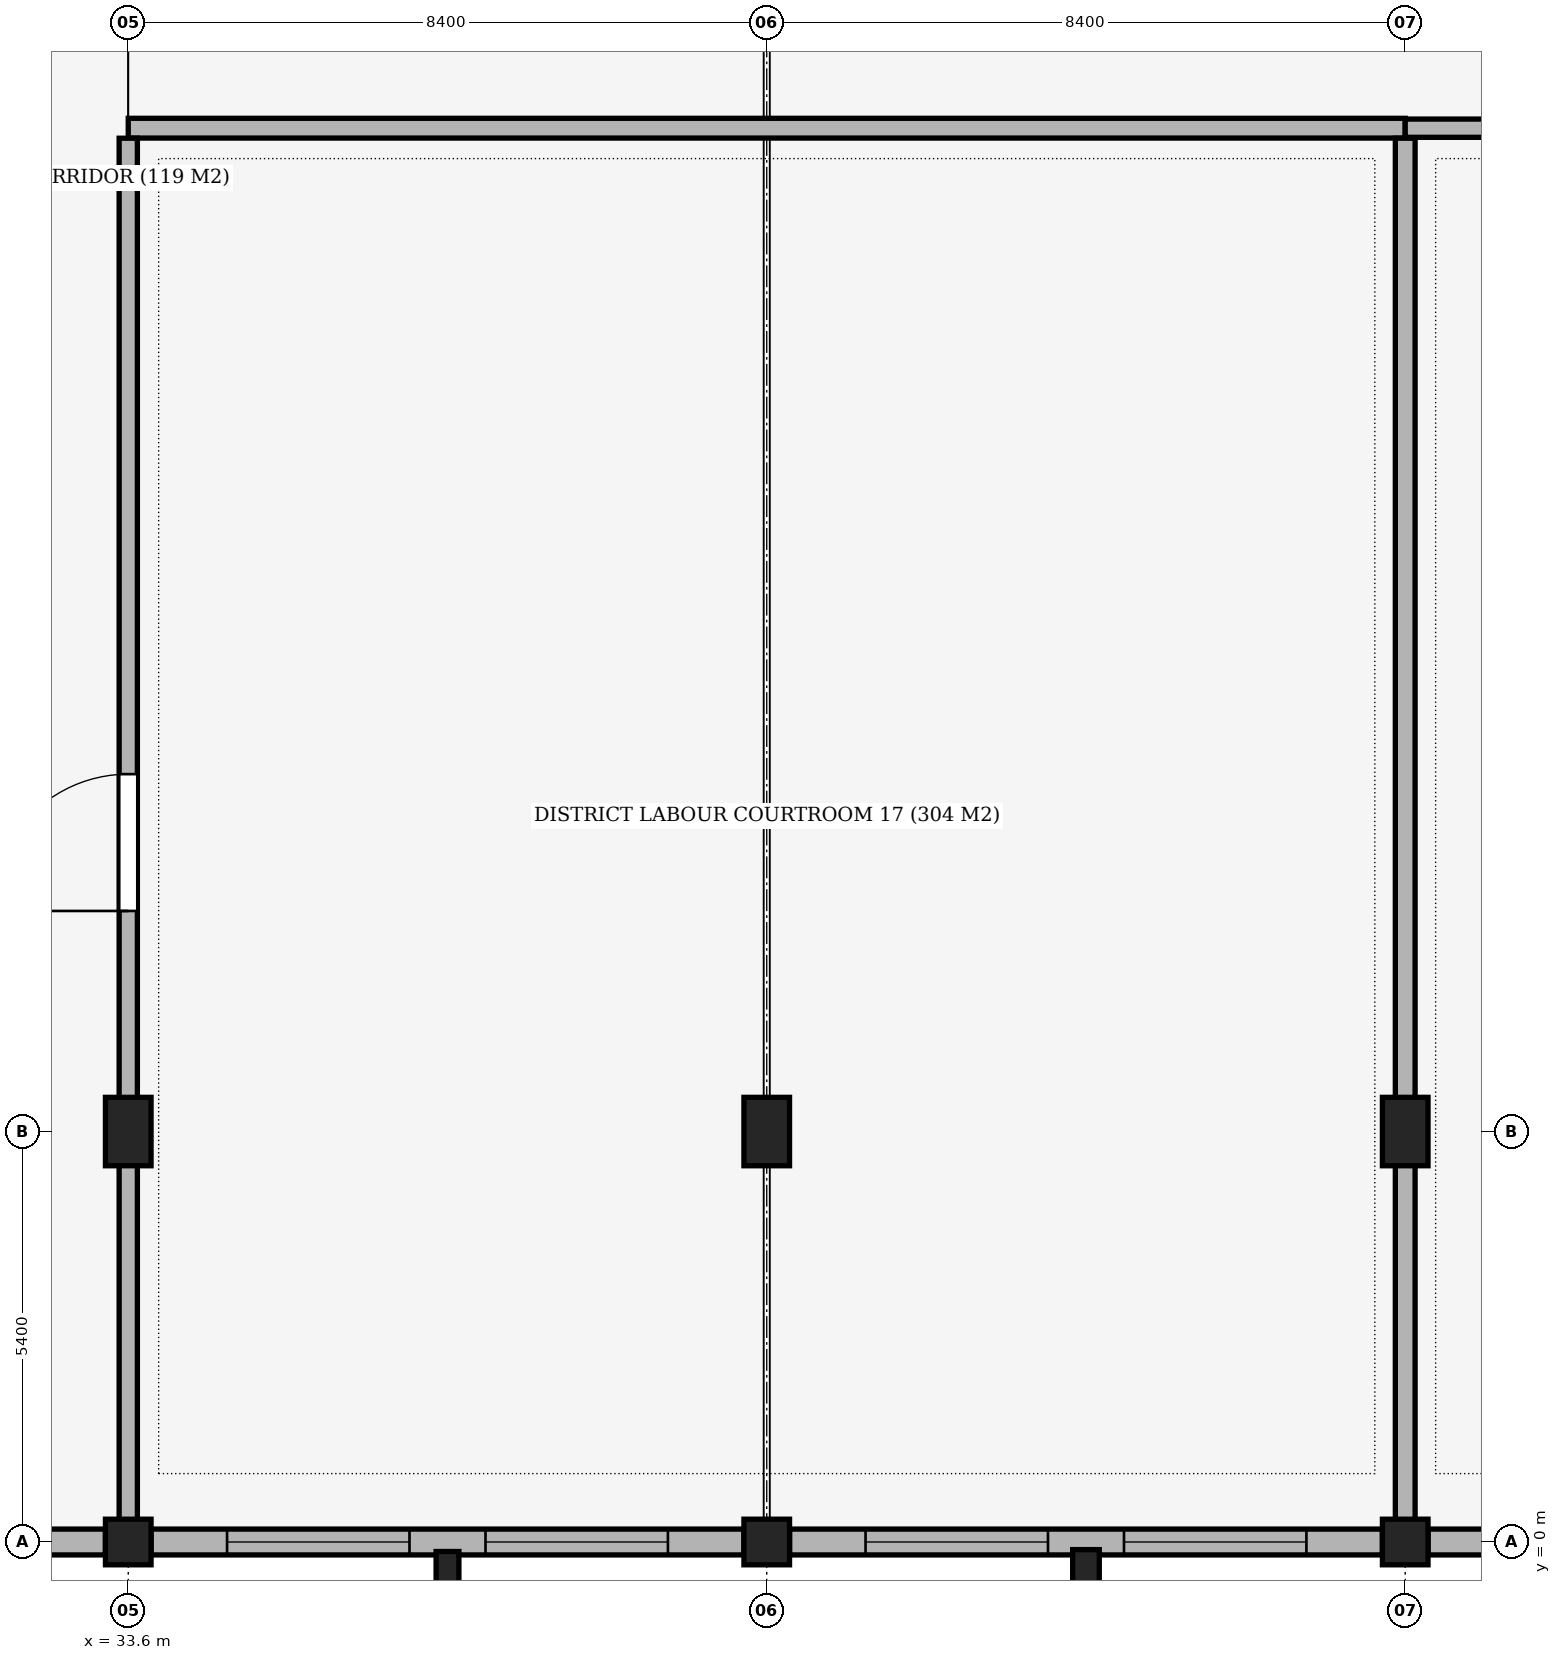
"""IFC4 building model, lengths in metres.
Left out: names, types, materials, properties, quantities, classifications, styles, units other than length and angle.
Written with IfcOpenShell. Run it as: python <this file> out.ifc"""

import sys

from ifc_helpers import new_model, si_unit, direction, frame, frame_2d, origin, origin_2d, place, context, subcontext, project, spatial, rectangle, extrude, element, fill, save


model = new_model("IFC4")
c1 = context("Model", 3, precision=1e-05, world=origin(), true_north=direction((0.0, 1.0)))
c2 = subcontext(c1, "Body", "Model", "MODEL_VIEW")
j1 = project(units=[si_unit("LENGTHUNIT", "METRE"), si_unit("PLANEANGLEUNIT", "RADIAN")], contexts=[c1])
p1 = place(None, origin())
s1 = spatial("IfcSite", under=j1, at=p1, CompositionType="ELEMENT")
p2 = place(p1, origin())
s2 = spatial("IfcBuilding", under=s1, at=p2, CompositionType="ELEMENT")
p3 = place(p2, frame((0.0, 0.0, 15.3)))
s3 = spatial("IfcBuildingStorey", under=s2, at=p3, CompositionType="ELEMENT", Elevation=15.3)
p4 = place(p3, frame((33.6, 0.0, 0.0), z_axis=(0.0, 0.0, 1.0), x_axis=(1.0, 0.0, 0.0)))
e1 = element("IfcColumn", 1, at=p4, inside=s3, PredefinedType="COLUMN", context=c2, shape_type="SweptSolid", body=[
    extrude(rectangle(XDim=0.6, YDim=0.6, at=origin_2d()), origin(), (0.0, 0.0, 1.0), 5.1),
])
p5 = place(p3, frame((33.6, 5.4, 0.0), z_axis=(0.0, 0.0, 1.0), x_axis=(1.0, 0.0, 0.0)))
e2 = element("IfcColumn", 2, at=p5, inside=s3, PredefinedType="COLUMN", context=c2, shape_type="SweptSolid", body=[
    extrude(rectangle(XDim=0.6, YDim=0.9, at=origin_2d()), origin(), (0.0, 0.0, 1.0), 5.1),
])
p6 = place(p3, frame((42.0, 0.0, 0.0), z_axis=(0.0, 0.0, 1.0), x_axis=(1.0, 0.0, 0.0)))
e3 = element("IfcColumn", 3, at=p6, inside=s3, PredefinedType="COLUMN", context=c2, shape_type="SweptSolid", body=[
    extrude(rectangle(XDim=0.6, YDim=0.6, at=origin_2d()), origin(), (0.0, 0.0, 1.0), 5.1),
])
p7 = place(p3, frame((42.0, 5.4, 0.0), z_axis=(0.0, 0.0, 1.0), x_axis=(1.0, 0.0, 0.0)))
e4 = element("IfcColumn", 4, at=p7, inside=s3, PredefinedType="COLUMN", context=c2, shape_type="SweptSolid", body=[
    extrude(rectangle(XDim=0.6, YDim=0.9, at=origin_2d()), origin(), (0.0, 0.0, 1.0), 5.1),
])
p8 = place(p3, frame((50.4, 0.0, 0.0), z_axis=(0.0, 0.0, 1.0), x_axis=(1.0, 0.0, 0.0)))
e5 = element("IfcColumn", 5, at=p8, inside=s3, PredefinedType="COLUMN", context=c2, shape_type="SweptSolid", body=[
    extrude(rectangle(XDim=0.6, YDim=0.6, at=origin_2d()), origin(), (0.0, 0.0, 1.0), 5.1),
])
p9 = place(p3, frame((50.4, 5.4, 0.0), z_axis=(0.0, 0.0, 1.0), x_axis=(1.0, 0.0, 0.0)))
e6 = element("IfcColumn", 6, at=p9, inside=s3, PredefinedType="COLUMN", context=c2, shape_type="SweptSolid", body=[
    extrude(rectangle(XDim=0.6, YDim=0.9, at=origin_2d()), origin(), (0.0, 0.0, 1.0), 5.1),
])
p10 = place(p3, frame((37.8, -0.35, 0.0), z_axis=(0.0, 0.0, 1.0), x_axis=(1.0, 0.0, 0.0)))
e7 = element("IfcColumn", 7, at=p10, inside=s3, PredefinedType="PILASTER", context=c2, shape_type="SweptSolid", body=[
    extrude(rectangle(XDim=0.3, YDim=0.45, at=origin_2d()), origin(), (0.0, 0.0, 1.0), 5.1),
])
p11 = place(p3, frame((46.2, -0.35, 0.0), z_axis=(0.0, 0.0, 1.0), x_axis=(1.0, 0.0, 0.0)))
e8 = element("IfcColumn", 8, at=p11, inside=s3, PredefinedType="PILASTER", context=c2, shape_type="SweptSolid", body=[
    extrude(rectangle(XDim=0.35, YDim=0.5, at=origin_2d()), origin(), (0.0, 0.0, 1.0), 5.1),
])
p12 = place(p3, frame((58.5, 0.0, 0.0), z_axis=(0.0, 0.0, 1.0), x_axis=(-1.0, 0.0, 0.0)))
e9 = element("IfcWall", 9, at=p12, inside=s3, PredefinedType="SOLIDWALL", context=c2, shape_type="SweptSolid", body=[
    extrude(rectangle(XDim=7.8, YDim=0.34, at=frame_2d((3.9, 0.0))), origin(), (0.0, 0.0, 1.0), 4.14),
])
p13 = place(p12, frame((1.0, 0.0, 0.85)))
e10 = element("IfcOpeningElement", 10, at=p13, cuts=e9, PredefinedType="OPENING", context=c2, shape_type="SweptSolid", body=[
    extrude(rectangle(XDim=2.4, YDim=2.4, at=frame_2d((1.2, 1.2))), frame((0.0, 0.185, 0.0), z_axis=(0.0, -1.0, 0.0), x_axis=(1.0, 0.0, 0.0)), (0.0, 0.0, 1.0), 0.37),
])
p14 = place(p12, frame((4.4, 0.0, 0.85)))
e11 = element("IfcOpeningElement", 11, at=p14, cuts=e9, PredefinedType="OPENING", context=c2, shape_type="SweptSolid", body=[
    extrude(rectangle(XDim=2.4, YDim=2.4, at=frame_2d((1.2, 1.2))), frame((0.0, 0.185, 0.0), z_axis=(0.0, -1.0, 0.0), x_axis=(1.0, 0.0, 0.0)), (0.0, 0.0, 1.0), 0.37),
])
p15 = place(p3, frame((50.1, 0.0, 0.0), z_axis=(0.0, 0.0, 1.0), x_axis=(-1.0, 0.0, 0.0)))
e12 = element("IfcWall", 12, at=p15, inside=s3, PredefinedType="SOLIDWALL", context=c2, shape_type="SweptSolid", body=[
    extrude(rectangle(XDim=7.8, YDim=0.34, at=frame_2d((3.9, 0.0))), origin(), (0.0, 0.0, 1.0), 4.14),
])
p16 = place(p15, frame((1.0, 0.0, 0.85)))
e13 = element("IfcOpeningElement", 13, at=p16, cuts=e12, PredefinedType="OPENING", context=c2, shape_type="SweptSolid", body=[
    extrude(rectangle(XDim=2.4, YDim=2.4, at=frame_2d((1.2, 1.2))), frame((0.0, 0.185, 0.0), z_axis=(0.0, -1.0, 0.0), x_axis=(1.0, 0.0, 0.0)), (0.0, 0.0, 1.0), 0.37),
])
p17 = place(p15, frame((4.4, 0.0, 0.85)))
e14 = element("IfcOpeningElement", 14, at=p17, cuts=e12, PredefinedType="OPENING", context=c2, shape_type="SweptSolid", body=[
    extrude(rectangle(XDim=2.4, YDim=2.4, at=frame_2d((1.2, 1.2))), frame((0.0, 0.185, 0.0), z_axis=(0.0, -1.0, 0.0), x_axis=(1.0, 0.0, 0.0)), (0.0, 0.0, 1.0), 0.37),
])
p18 = place(p3, frame((41.7, 0.0, 0.0), z_axis=(0.0, 0.0, 1.0), x_axis=(-1.0, 0.0, 0.0)))
e15 = element("IfcWall", 15, at=p18, inside=s3, PredefinedType="SOLIDWALL", context=c2, shape_type="SweptSolid", body=[
    extrude(rectangle(XDim=7.8, YDim=0.34, at=frame_2d((3.9, 0.0))), origin(), (0.0, 0.0, 1.0), 4.14),
])
p19 = place(p18, frame((1.0, 0.0, 0.85)))
e16 = element("IfcOpeningElement", 16, at=p19, cuts=e15, PredefinedType="OPENING", context=c2, shape_type="SweptSolid", body=[
    extrude(rectangle(XDim=2.4, YDim=2.4, at=frame_2d((1.2, 1.2))), frame((0.0, 0.185, 0.0), z_axis=(0.0, -1.0, 0.0), x_axis=(1.0, 0.0, 0.0)), (0.0, 0.0, 1.0), 0.37),
])
p20 = place(p18, frame((4.4, 0.0, 0.85)))
e17 = element("IfcOpeningElement", 17, at=p20, cuts=e15, PredefinedType="OPENING", context=c2, shape_type="SweptSolid", body=[
    extrude(rectangle(XDim=2.4, YDim=2.4, at=frame_2d((1.2, 1.2))), frame((0.0, 0.185, 0.0), z_axis=(0.0, -1.0, 0.0), x_axis=(1.0, 0.0, 0.0)), (0.0, 0.0, 1.0), 0.37),
])
p21 = place(p3, frame((33.3, 0.0, 0.0), z_axis=(0.0, 0.0, 1.0), x_axis=(-1.0, 0.0, 0.0)))
e18 = element("IfcWall", 18, at=p21, inside=s3, PredefinedType="SOLIDWALL", context=c2, shape_type="SweptSolid", body=[
    extrude(rectangle(XDim=7.8, YDim=0.34, at=frame_2d((3.9, 0.0))), origin(), (0.0, 0.0, 1.0), 4.14),
])
p22 = place(p21, frame((4.267, 0.0, 0.75)))
e19 = element("IfcOpeningElement", 19, at=p22, cuts=e18, PredefinedType="OPENING", context=c2, shape_type="SweptSolid", body=[
    extrude(rectangle(XDim=2.8, YDim=2.6, at=frame_2d((1.4, 1.3))), frame((0.0, 0.185, 0.0), z_axis=(0.0, -1.0, 0.0), x_axis=(1.0, 0.0, 0.0)), (0.0, 0.0, 1.0), 0.37),
])
p23 = place(p3, frame((33.6, 18.6, 0.0), z_axis=(0.0, 0.0, 1.0), x_axis=(1.0, 0.0, 0.0)))
e20 = element("IfcWall", 20, at=p23, inside=s3, PredefinedType="PARTITIONING", context=c2, shape_type="SweptSolid", body=[
    extrude(rectangle(XDim=16.8, YDim=0.26, at=frame_2d((8.4, 0.0))), origin(), (0.0, 0.0, 1.0), 3.79),
])
p24 = place(p3, frame((50.4, 18.6, 0.0), z_axis=(0.0, 0.0, 1.0), x_axis=(1.0, 0.0, 0.0)))
e21 = element("IfcWall", 21, at=p24, inside=s3, PredefinedType="PARTITIONING", context=c2, shape_type="SweptSolid", body=[
    extrude(rectangle(XDim=16.8, YDim=0.24, at=frame_2d((8.4, 0.0))), origin(), (0.0, 0.0, 1.0), 3.79),
])
p25 = place(p24, frame((7.5, 0.0, 0.0)))
e22 = element("IfcOpeningElement", 22, at=p25, cuts=e21, PredefinedType="OPENING", context=c2, shape_type="SweptSolid", body=[
    extrude(rectangle(XDim=1.8, YDim=2.4, at=frame_2d((0.9, 1.2))), frame((0.0, 0.135, 0.0), z_axis=(0.0, -1.0, 0.0), x_axis=(1.0, 0.0, 0.0)), (0.0, 0.0, 1.0), 0.27),
])
p26 = place(p3, frame((33.6, -0.064, 0.0), z_axis=(0.0, 0.0, 1.0), x_axis=(0.0, 1.0, 0.0)))
e23 = element("IfcWall", 23, at=p26, inside=s3, PredefinedType="PARTITIONING", context=c2, shape_type="SweptSolid", body=[
    extrude(rectangle(XDim=18.532, YDim=0.24, at=frame_2d((9.266, 0.0))), origin(), (0.0, 0.0, 1.0), 3.79),
])
p27 = place(p26, frame((8.366, 0.0, 0.0)))
e24 = element("IfcOpeningElement", 24, at=p27, cuts=e23, PredefinedType="OPENING", context=c2, shape_type="SweptSolid", body=[
    extrude(rectangle(XDim=1.8, YDim=2.4, at=frame_2d((0.9, 1.2))), frame((0.0, 0.135, 0.0), z_axis=(0.0, -1.0, 0.0), x_axis=(1.0, 0.0, 0.0)), (0.0, 0.0, 1.0), 0.27),
])
p28 = place(p3, frame((50.4, -0.064, 0.0), z_axis=(0.0, 0.0, 1.0), x_axis=(0.0, 1.0, 0.0)))
e25 = element("IfcWall", 25, at=p28, inside=s3, PredefinedType="PARTITIONING", context=c2, shape_type="SweptSolid", body=[
    extrude(rectangle(XDim=18.532, YDim=0.26, at=frame_2d((9.266, 0.0))), origin(), (0.0, 0.0, 1.0), 3.79),
])
p29 = place(p16, origin())
e26 = element("IfcWindow", 26, at=p29, inside=s3, PartitioningType="SINGLE_PANEL", PredefinedType="WINDOW", context=c2, shape_type="SweptSolid", body=[
    extrude(rectangle(XDim=2.4, YDim=2.4, at=frame_2d((1.2, 1.2))), frame((0.0, 0.03, 0.0), z_axis=(0.0, -1.0, 0.0), x_axis=(1.0, 0.0, 0.0)), (0.0, 0.0, 1.0), 0.06),
])
fill(e13, e26)
p30 = place(p17, origin())
e27 = element("IfcWindow", 27, at=p30, inside=s3, PartitioningType="SINGLE_PANEL", PredefinedType="WINDOW", context=c2, shape_type="SweptSolid", body=[
    extrude(rectangle(XDim=2.4, YDim=2.4, at=frame_2d((1.2, 1.2))), frame((0.0, 0.03, 0.0), z_axis=(0.0, -1.0, 0.0), x_axis=(1.0, 0.0, 0.0)), (0.0, 0.0, 1.0), 0.06),
])
fill(e14, e27)
p31 = place(p19, origin())
e28 = element("IfcWindow", 28, at=p31, inside=s3, PartitioningType="SINGLE_PANEL", PredefinedType="WINDOW", context=c2, shape_type="SweptSolid", body=[
    extrude(rectangle(XDim=2.4, YDim=2.4, at=frame_2d((1.2, 1.2))), frame((0.0, 0.03, 0.0), z_axis=(0.0, -1.0, 0.0), x_axis=(1.0, 0.0, 0.0)), (0.0, 0.0, 1.0), 0.06),
])
fill(e16, e28)
p32 = place(p20, origin())
e29 = element("IfcWindow", 29, at=p32, inside=s3, PartitioningType="SINGLE_PANEL", PredefinedType="WINDOW", context=c2, shape_type="SweptSolid", body=[
    extrude(rectangle(XDim=2.4, YDim=2.4, at=frame_2d((1.2, 1.2))), frame((0.0, 0.03, 0.0), z_axis=(0.0, -1.0, 0.0), x_axis=(1.0, 0.0, 0.0)), (0.0, 0.0, 1.0), 0.06),
])
fill(e17, e29)
p33 = place(p27, origin())
e30 = element("IfcDoor", 30, at=p33, inside=s3, OperationType="SINGLE_SWING_LEFT", PredefinedType="DOOR", context=c2, shape_type="SweptSolid", body=[
    extrude(rectangle(XDim=1.8, YDim=2.4, at=frame_2d((0.9, 1.2))), frame((0.0, 0.025, 0.0), z_axis=(0.0, -1.0, 0.0), x_axis=(1.0, 0.0, 0.0)), (0.0, 0.0, 1.0), 0.05),
])
fill(e24, e30)
save(model, sys.argv[1])
